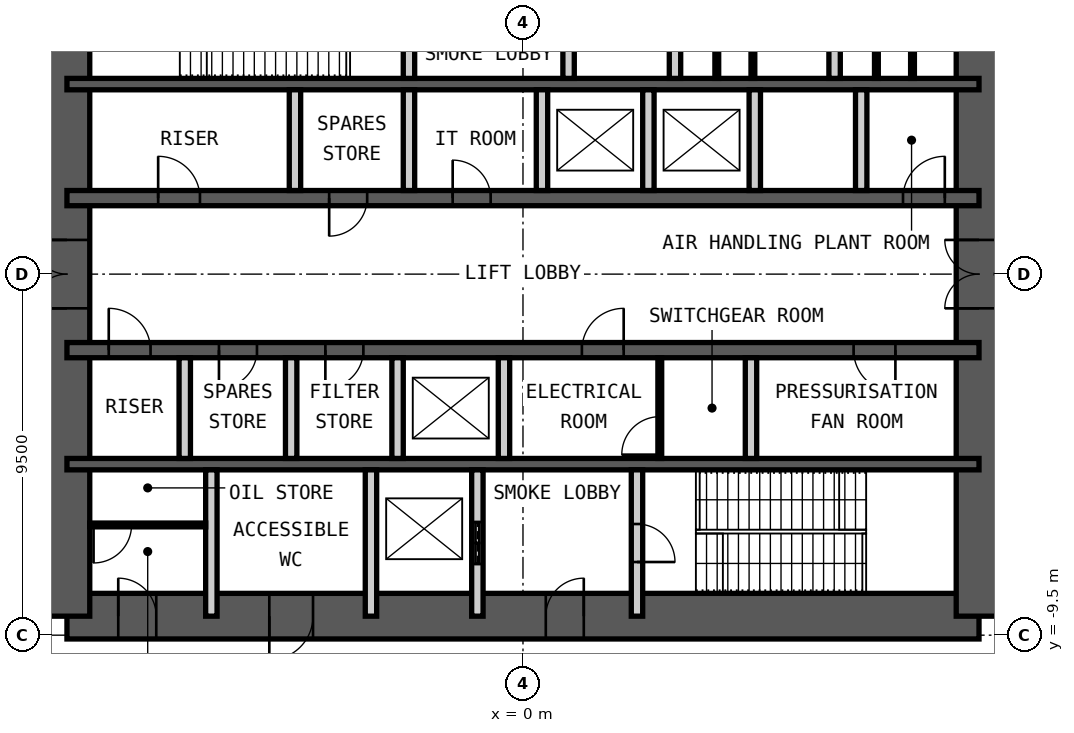
"""IFC4 building model, lengths in metres.
Left out: names, types, materials, properties, quantities, classifications, styles, units other than length and angle.
Written with IfcOpenShell. Run it as: python <this file> out.ifc"""

import sys

from ifc_helpers import new_model, si_unit, direction, frame, frame_2d, origin, place, context, subcontext, project, spatial, rectangle, extrude, element, fill, save


model = new_model("IFC4")
c1 = context("Model", 3, precision=1e-05, world=origin(), true_north=direction((0.0, 1.0)))
c2 = subcontext(c1, "Body", "Model", "MODEL_VIEW")
j1 = project(units=[si_unit("LENGTHUNIT", "METRE"), si_unit("PLANEANGLEUNIT", "RADIAN")], contexts=[c1])
p1 = place(None, origin())
s1 = spatial("IfcSite", under=j1, at=p1, CompositionType="ELEMENT")
p2 = place(p1, origin())
s2 = spatial("IfcBuilding", under=s1, at=p2, CompositionType="ELEMENT")
p3 = place(p2, frame((0.0, 0.0, 256.0)))
s3 = spatial("IfcBuildingStorey", under=s2, at=p3, CompositionType="ELEMENT", Elevation=256.0)
p4 = place(p3, frame((-12.0, -9.0, 0.0), z_axis=(0.0, 0.0, 1.0), x_axis=(1.0, 0.0, 0.0)))
e1 = element("IfcWall", 1, at=p4, inside=s3, PredefinedType="SHEAR", context=c2, shape_type="SweptSolid", body=[
    extrude(rectangle(XDim=24.0, YDim=1.2, at=frame_2d((12.0, 0.0))), origin(), (0.0, 0.0, 1.0), 6.0),
])
p5 = place(p4, frame((1.35, 0.0, 0.0)))
e2 = element("IfcOpeningElement", 2, at=p5, cuts=e1, PredefinedType="OPENING", context=c2, shape_type="SweptSolid", body=[
    extrude(rectangle(XDim=1.0, YDim=2.1, at=frame_2d((0.5, 1.05))), frame((0.0, 0.61, 0.0), z_axis=(0.0, -1.0, 0.0), x_axis=(1.0, 0.0, 0.0)), (0.0, 0.0, 1.0), 1.22),
])
p6 = place(p4, frame((5.325, 0.0, 0.0)))
e3 = element("IfcOpeningElement", 3, at=p6, cuts=e1, PredefinedType="OPENING", context=c2, shape_type="SweptSolid", body=[
    extrude(rectangle(XDim=1.15, YDim=2.1, at=frame_2d((0.575, 1.05))), frame((0.0, 0.61, 0.0), z_axis=(0.0, -1.0, 0.0), x_axis=(1.0, 0.0, 0.0)), (0.0, 0.0, 1.0), 1.22),
])
p7 = place(p4, frame((12.6, 0.0, 0.0)))
e4 = element("IfcOpeningElement", 4, at=p7, cuts=e1, PredefinedType="OPENING", context=c2, shape_type="SweptSolid", body=[
    extrude(rectangle(XDim=1.0, YDim=2.1, at=frame_2d((0.5, 1.05))), frame((0.0, 0.61, 0.0), z_axis=(0.0, -1.0, 0.0), x_axis=(1.0, 0.0, 0.0)), (0.0, 0.0, 1.0), 1.22),
])
p8 = place(p3, frame((12.0, -9.0, 0.0), z_axis=(0.0, 0.0, 1.0), x_axis=(0.0, 1.0, 0.0)))
e5 = element("IfcWall", 5, at=p8, inside=s3, PredefinedType="SHEAR", context=c2, shape_type="SweptSolid", body=[
    extrude(rectangle(XDim=18.0, YDim=1.2, at=frame_2d((9.0, 0.0))), origin(), (0.0, 0.0, 1.0), 6.0),
])
p9 = place(p8, frame((8.1, 0.0, 0.0)))
e6 = element("IfcOpeningElement", 6, at=p9, cuts=e5, PredefinedType="OPENING", context=c2, shape_type="SweptSolid", body=[
    extrude(rectangle(XDim=1.8, YDim=2.1, at=frame_2d((0.9, 1.05))), frame((0.0, 0.61, 0.0), z_axis=(0.0, -1.0, 0.0), x_axis=(1.0, 0.0, 0.0)), (0.0, 0.0, 1.0), 1.22),
])
p10 = place(p3, frame((-12.0, -9.0, 0.0), z_axis=(0.0, 0.0, 1.0), x_axis=(0.0, 1.0, 0.0)))
e7 = element("IfcWall", 7, at=p10, inside=s3, PredefinedType="SHEAR", context=c2, shape_type="SweptSolid", body=[
    extrude(rectangle(XDim=18.0, YDim=1.2, at=frame_2d((9.0, 0.0))), origin(), (0.0, 0.0, 1.0), 6.0),
])
p11 = place(p10, frame((8.1, 0.0, 0.0)))
e8 = element("IfcOpeningElement", 8, at=p11, cuts=e7, PredefinedType="OPENING", context=c2, shape_type="SweptSolid", body=[
    extrude(rectangle(XDim=1.8, YDim=2.1, at=frame_2d((0.9, 1.05))), frame((0.0, 0.61, 0.0), z_axis=(0.0, -1.0, 0.0), x_axis=(1.0, 0.0, 0.0)), (0.0, 0.0, 1.0), 1.22),
])
p12 = place(p3, frame((-12.0, 5.0, 0.0), z_axis=(0.0, 0.0, 1.0), x_axis=(1.0, 0.0, 0.0)))
e9 = element("IfcWall", 9, at=p12, inside=s3, PredefinedType="SHEAR", context=c2, shape_type="SweptSolid", body=[
    extrude(rectangle(XDim=24.0, YDim=0.3, at=frame_2d((12.0, 0.0))), origin(), (0.0, 0.0, 1.0), 6.0),
])
p13 = place(p3, frame((-12.0, 2.0, 0.0), z_axis=(0.0, 0.0, 1.0), x_axis=(1.0, 0.0, 0.0)))
e10 = element("IfcWall", 10, at=p13, inside=s3, PredefinedType="SHEAR", context=c2, shape_type="SweptSolid", body=[
    extrude(rectangle(XDim=24.0, YDim=0.4, at=frame_2d((12.0, 0.0))), origin(), (0.0, 0.0, 1.0), 6.0),
])
p14 = place(p13, frame((2.4, 0.0, 0.0)))
e11 = element("IfcOpeningElement", 11, at=p14, cuts=e10, PredefinedType="OPENING", context=c2, shape_type="SweptSolid", body=[
    extrude(rectangle(XDim=1.1, YDim=2.1, at=frame_2d((0.55, 1.05))), frame((0.0, 0.21, 0.0), z_axis=(0.0, -1.0, 0.0), x_axis=(1.0, 0.0, 0.0)), (0.0, 0.0, 1.0), 0.42),
])
p15 = place(p13, frame((22.0, 0.0, 0.0)))
e12 = element("IfcOpeningElement", 12, at=p15, cuts=e10, PredefinedType="OPENING", context=c2, shape_type="SweptSolid", body=[
    extrude(rectangle(XDim=1.1, YDim=2.1, at=frame_2d((0.55, 1.05))), frame((0.0, 0.21, 0.0), z_axis=(0.0, -1.0, 0.0), x_axis=(1.0, 0.0, 0.0)), (0.0, 0.0, 1.0), 0.42),
])
p16 = place(p13, frame((10.15, 0.0, 0.0)))
e13 = element("IfcOpeningElement", 13, at=p16, cuts=e10, PredefinedType="OPENING", context=c2, shape_type="SweptSolid", body=[
    extrude(rectangle(XDim=1.0, YDim=2.1, at=frame_2d((0.5, 1.05))), frame((0.0, 0.21, 0.0), z_axis=(0.0, -1.0, 0.0), x_axis=(1.0, 0.0, 0.0)), (0.0, 0.0, 1.0), 0.42),
])
p17 = place(p13, frame((6.9, 0.0, 0.0)))
e14 = element("IfcOpeningElement", 14, at=p17, cuts=e10, PredefinedType="OPENING", context=c2, shape_type="SweptSolid", body=[
    extrude(rectangle(XDim=1.0, YDim=2.1, at=frame_2d((0.5, 1.05))), frame((0.0, 0.21, 0.0), z_axis=(0.0, -1.0, 0.0), x_axis=(1.0, 0.0, 0.0)), (0.0, 0.0, 1.0), 0.42),
])
p18 = place(p3, frame((-12.0, -2.0, 0.0), z_axis=(0.0, 0.0, 1.0), x_axis=(1.0, 0.0, 0.0)))
e15 = element("IfcWall", 15, at=p18, inside=s3, PredefinedType="SHEAR", context=c2, shape_type="SweptSolid", body=[
    extrude(rectangle(XDim=24.0, YDim=0.4, at=frame_2d((12.0, 0.0))), origin(), (0.0, 0.0, 1.0), 6.0),
])
p19 = place(p18, frame((1.1, 0.0, 0.0)))
e16 = element("IfcOpeningElement", 16, at=p19, cuts=e15, PredefinedType="OPENING", context=c2, shape_type="SweptSolid", body=[
    extrude(rectangle(XDim=1.1, YDim=2.1, at=frame_2d((0.55, 1.05))), frame((0.0, 0.21, 0.0), z_axis=(0.0, -1.0, 0.0), x_axis=(1.0, 0.0, 0.0)), (0.0, 0.0, 1.0), 0.42),
])
p20 = place(p18, frame((13.55, 0.0, 0.0)))
e17 = element("IfcOpeningElement", 17, at=p20, cuts=e15, PredefinedType="OPENING", context=c2, shape_type="SweptSolid", body=[
    extrude(rectangle(XDim=1.1, YDim=2.1, at=frame_2d((0.55, 1.05))), frame((0.0, 0.21, 0.0), z_axis=(0.0, -1.0, 0.0), x_axis=(1.0, 0.0, 0.0)), (0.0, 0.0, 1.0), 0.42),
])
p21 = place(p18, frame((20.7, 0.0, 0.0)))
e18 = element("IfcOpeningElement", 18, at=p21, cuts=e15, PredefinedType="OPENING", context=c2, shape_type="SweptSolid", body=[
    extrude(rectangle(XDim=1.1, YDim=2.1, at=frame_2d((0.55, 1.05))), frame((0.0, 0.21, 0.0), z_axis=(0.0, -1.0, 0.0), x_axis=(1.0, 0.0, 0.0)), (0.0, 0.0, 1.0), 0.42),
])
p22 = place(p18, frame((4.0, 0.0, 0.0)))
e19 = element("IfcOpeningElement", 19, at=p22, cuts=e15, PredefinedType="OPENING", context=c2, shape_type="SweptSolid", body=[
    extrude(rectangle(XDim=1.0, YDim=2.1, at=frame_2d((0.5, 1.05))), frame((0.0, 0.21, 0.0), z_axis=(0.0, -1.0, 0.0), x_axis=(1.0, 0.0, 0.0)), (0.0, 0.0, 1.0), 0.42),
])
p23 = place(p18, frame((6.8, 0.0, 0.0)))
e20 = element("IfcOpeningElement", 20, at=p23, cuts=e15, PredefinedType="OPENING", context=c2, shape_type="SweptSolid", body=[
    extrude(rectangle(XDim=1.0, YDim=2.1, at=frame_2d((0.5, 1.05))), frame((0.0, 0.21, 0.0), z_axis=(0.0, -1.0, 0.0), x_axis=(1.0, 0.0, 0.0)), (0.0, 0.0, 1.0), 0.42),
])
p24 = place(p3, frame((-12.0, -5.0, 0.0), z_axis=(0.0, 0.0, 1.0), x_axis=(1.0, 0.0, 0.0)))
e21 = element("IfcWall", 21, at=p24, inside=s3, PredefinedType="SHEAR", context=c2, shape_type="SweptSolid", body=[
    extrude(rectangle(XDim=24.0, YDim=0.3, at=frame_2d((12.0, 0.0))), origin(), (0.0, 0.0, 1.0), 6.0),
])
p25 = place(p3, frame((-3.0, 5.15, 0.0), z_axis=(0.0, 0.0, 1.0), x_axis=(0.0, 1.0, 0.0)))
e22 = element("IfcWall", 22, at=p25, inside=s3, PredefinedType="PARTITIONING", context=c2, shape_type="SweptSolid", body=[
    extrude(rectangle(XDim=3.85, YDim=0.3, at=frame_2d((1.925, 0.0))), origin(), (0.0, 0.0, 1.0), 5.78),
])
p26 = place(p25, frame((1.425, 0.0, 0.0)))
e23 = element("IfcOpeningElement", 23, at=p26, cuts=e22, PredefinedType="OPENING", context=c2, shape_type="SweptSolid", body=[
    extrude(rectangle(XDim=1.0, YDim=2.1, at=frame_2d((0.5, 1.05))), frame((0.0, 0.16, 0.0), z_axis=(0.0, -1.0, 0.0), x_axis=(1.0, 0.0, 0.0)), (0.0, 0.0, 1.0), 0.32),
])
p27 = place(p3, frame((1.2, 5.15, 0.0), z_axis=(0.0, 0.0, 1.0), x_axis=(0.0, 1.0, 0.0)))
e24 = element("IfcWall", 24, at=p27, inside=s3, PredefinedType="PARTITIONING", context=c2, shape_type="SweptSolid", body=[
    extrude(rectangle(XDim=3.85, YDim=0.3, at=frame_2d((1.925, 0.0))), origin(), (0.0, 0.0, 1.0), 5.78),
])
p28 = place(p27, frame((1.375, 0.0, 0.0)))
e25 = element("IfcOpeningElement", 25, at=p28, cuts=e24, PredefinedType="OPENING", context=c2, shape_type="SweptSolid", body=[
    extrude(rectangle(XDim=1.1, YDim=2.4, at=frame_2d((0.55, 1.2))), frame((0.0, 0.16, 0.0), z_axis=(0.0, -1.0, 0.0), x_axis=(1.0, 0.0, 0.0)), (0.0, 0.0, 1.0), 0.32),
])
for number, where, z_axis, x_axis in (
    (26, (4.0, 5.15, 0.0), (0.0, 0.0, 1.0), (0.0, 1.0, 0.0)),
    (27, (8.2, 5.15, 0.0), (0.0, 0.0, 1.0), (0.0, 1.0, 0.0)),
):
    element("IfcWall", number, at=place(p3, frame(where, z_axis=z_axis, x_axis=x_axis)), inside=s3, PredefinedType="PARTITIONING", context=c2, shape_type="SweptSolid", body=[
        extrude(rectangle(XDim=3.85, YDim=0.3, at=frame_2d((1.925, 0.0))), origin(), (0.0, 0.0, 1.0), 5.78),
    ])
for number, where, z_axis, x_axis in (
    (28, (-6.0, 2.2, 0.0), (0.0, 0.0, 1.0), (0.0, 1.0, 0.0)),
    (29, (-3.0, 2.2, 0.0), (0.0, 0.0, 1.0), (0.0, 1.0, 0.0)),
    (30, (0.5, 2.2, 0.0), (0.0, 0.0, 1.0), (0.0, 1.0, 0.0)),
    (31, (3.3, 2.2, 0.0), (0.0, 0.0, 1.0), (0.0, 1.0, 0.0)),
    (32, (6.1, 2.2, 0.0), (0.0, 0.0, 1.0), (0.0, 1.0, 0.0)),
    (33, (8.9, 2.2, 0.0), (0.0, 0.0, 1.0), (0.0, 1.0, 0.0)),
    (34, (-8.9, -4.85, 0.0), (0.0, 0.0, 1.0), (0.0, 1.0, 0.0)),
    (35, (-6.1, -4.85, 0.0), (0.0, 0.0, 1.0), (0.0, 1.0, 0.0)),
    (36, (-3.3, -4.85, 0.0), (0.0, 0.0, 1.0), (0.0, 1.0, 0.0)),
    (37, (-0.5, -4.85, 0.0), (0.0, 0.0, 1.0), (0.0, 1.0, 0.0)),
    (38, (6.0, -4.85, 0.0), (0.0, 0.0, 1.0), (0.0, 1.0, 0.0)),
):
    element("IfcWall", number, at=place(p3, frame(where, z_axis=z_axis, x_axis=x_axis)), inside=s3, PredefinedType="PARTITIONING", context=c2, shape_type="SweptSolid", body=[
        extrude(rectangle(XDim=2.65, YDim=0.3, at=frame_2d((1.325, 0.0))), origin(), (0.0, 0.0, 1.0), 5.78),
    ])
for number, where, z_axis, x_axis in (
    (39, (-8.2, -9.0, 0.0), (0.0, 0.0, 1.0), (0.0, 1.0, 0.0)),
    (40, (-4.0, -9.0, 0.0), (0.0, 0.0, 1.0), (0.0, 1.0, 0.0)),
):
    element("IfcWall", number, at=place(p3, frame(where, z_axis=z_axis, x_axis=x_axis)), inside=s3, PredefinedType="PARTITIONING", context=c2, shape_type="SweptSolid", body=[
        extrude(rectangle(XDim=3.85, YDim=0.3, at=frame_2d((1.925, 0.0))), origin(), (0.0, 0.0, 1.0), 5.78),
    ])
p29 = place(p3, frame((-1.2, -9.0, 0.0), z_axis=(0.0, 0.0, 1.0), x_axis=(0.0, 1.0, 0.0)))
e41 = element("IfcWall", 41, at=p29, inside=s3, PredefinedType="PARTITIONING", context=c2, shape_type="SweptSolid", body=[
    extrude(rectangle(XDim=3.85, YDim=0.3, at=frame_2d((1.925, 0.0))), origin(), (0.0, 0.0, 1.0), 5.78),
])
p30 = place(p29, frame((1.375, 0.0, 0.0)))
e42 = element("IfcOpeningElement", 42, at=p30, cuts=e41, PredefinedType="OPENING", context=c2, shape_type="SweptSolid", body=[
    extrude(rectangle(XDim=1.1, YDim=2.4, at=frame_2d((0.55, 1.2))), frame((0.0, 0.16, 0.0), z_axis=(0.0, -1.0, 0.0), x_axis=(1.0, 0.0, 0.0)), (0.0, 0.0, 1.0), 0.32),
])
p31 = place(p3, frame((3.0, -9.0, 0.0), z_axis=(0.0, 0.0, 1.0), x_axis=(0.0, 1.0, 0.0)))
e43 = element("IfcWall", 43, at=p31, inside=s3, PredefinedType="PARTITIONING", context=c2, shape_type="SweptSolid", body=[
    extrude(rectangle(XDim=3.85, YDim=0.3, at=frame_2d((1.925, 0.0))), origin(), (0.0, 0.0, 1.0), 5.78),
])
p32 = place(p31, frame((1.425, 0.0, 0.0)))
e44 = element("IfcOpeningElement", 44, at=p32, cuts=e43, PredefinedType="OPENING", context=c2, shape_type="SweptSolid", body=[
    extrude(rectangle(XDim=1.0, YDim=2.1, at=frame_2d((0.5, 1.05))), frame((0.0, 0.16, 0.0), z_axis=(0.0, -1.0, 0.0), x_axis=(1.0, 0.0, 0.0)), (0.0, 0.0, 1.0), 0.32),
])
p33 = place(p3, frame((3.6, -4.85, 0.0), z_axis=(0.0, 0.0, 1.0), x_axis=(0.0, 1.0, 0.0)))
e45 = element("IfcWall", 45, at=p33, inside=s3, PredefinedType="PARTITIONING", context=c2, shape_type="SweptSolid", body=[
    extrude(rectangle(XDim=2.65, YDim=0.1, at=frame_2d((1.325, 0.0))), origin(), (0.0, 0.0, 1.0), 5.78),
])
p34 = place(p33, frame((0.1, 0.0, 0.0)))
e46 = element("IfcOpeningElement", 46, at=p34, cuts=e45, PredefinedType="OPENING", context=c2, shape_type="SweptSolid", body=[
    extrude(rectangle(XDim=1.0, YDim=2.4, at=frame_2d((0.5, 1.2))), frame((0.0, 0.06, 0.0), z_axis=(0.0, -1.0, 0.0), x_axis=(1.0, 0.0, 0.0)), (0.0, 0.0, 1.0), 0.12),
])
p35 = place(p3, frame((-11.4, -6.6, 0.0), z_axis=(0.0, 0.0, 1.0), x_axis=(1.0, 0.0, 0.0)))
e47 = element("IfcWall", 47, at=p35, inside=s3, PredefinedType="PARTITIONING", context=c2, shape_type="SweptSolid", body=[
    extrude(rectangle(XDim=3.05, YDim=0.1, at=frame_2d((1.525, 0.0))), origin(), (0.0, 0.0, 1.0), 5.78),
])
p36 = place(p35, frame((0.1, 0.0, 0.0)))
e48 = element("IfcOpeningElement", 48, at=p36, cuts=e47, PredefinedType="OPENING", context=c2, shape_type="SweptSolid", body=[
    extrude(rectangle(XDim=1.0, YDim=2.4, at=frame_2d((0.5, 1.2))), frame((0.0, 0.06, 0.0), z_axis=(0.0, -1.0, 0.0), x_axis=(1.0, 0.0, 0.0)), (0.0, 0.0, 1.0), 0.12),
])
for number, where, z_axis, x_axis in (
    (49, (5.1, 5.15, 0.0), (0.0, 0.0, 1.0), (0.0, 1.0, 0.0)),
    (50, (6.05, 5.15, 0.0), (0.0, 0.0, 1.0), (0.0, 1.0, 0.0)),
    (51, (9.3, 5.15, 0.0), (0.0, 0.0, 1.0), (0.0, 1.0, 0.0)),
    (52, (10.25, 5.15, 0.0), (0.0, 0.0, 1.0), (0.0, 1.0, 0.0)),
):
    element("IfcWall", number, at=place(p3, frame(where, z_axis=z_axis, x_axis=x_axis)), inside=s3, PredefinedType="PARTITIONING", context=c2, shape_type="SweptSolid", body=[
        extrude(rectangle(XDim=1.5, YDim=0.1, at=frame_2d((0.75, 0.0))), origin(), (0.0, 0.0, 1.0), 2.1),
    ])
p37 = place(p3, frame((-11.917, -11.76, 0.0), z_axis=(0.0, 0.0, 1.0), x_axis=(-0.500003318956, 0.866023487576, 0.0)))
e53 = element("IfcWall", 53, at=p37, inside=s3, PredefinedType="PARTITIONING", context=c2, shape_type="SweptSolid", body=[
    extrude(rectangle(XDim=6.496, YDim=0.2, at=frame_2d((3.248, 0.0))), origin(), (0.0, 0.0, 1.0), 5.83),
])
p38 = place(p37, frame((4.197, 0.0, 0.0)))
e54 = element("IfcOpeningElement", 54, at=p38, cuts=e53, PredefinedType="OPENING", context=c2, shape_type="SweptSolid", body=[
    extrude(rectangle(XDim=2.0, YDim=2.4, at=frame_2d((1.0, 1.2))), frame((0.0, 0.11, 0.0), z_axis=(0.0, -1.0, 0.0), x_axis=(1.0, 0.0, 0.0)), (0.0, 0.0, 1.0), 0.22),
])
p39 = place(p5, origin())
e55 = element("IfcDoor", 55, at=p39, inside=s3, OperationType="SINGLE_SWING_RIGHT", PredefinedType="DOOR", context=c2, shape_type="SweptSolid", body=[
    extrude(rectangle(XDim=1.0, YDim=2.1, at=frame_2d((0.5, 1.05))), frame((0.0, 0.025, 0.0), z_axis=(0.0, -1.0, 0.0), x_axis=(1.0, 0.0, 0.0)), (0.0, 0.0, 1.0), 0.05),
])
fill(e2, e55)
p40 = place(p6, origin())
e56 = element("IfcDoor", 56, at=p40, inside=s3, OperationType="SINGLE_SWING_LEFT", PredefinedType="DOOR", context=c2, shape_type="SweptSolid", body=[
    extrude(rectangle(XDim=1.15, YDim=2.1, at=frame_2d((0.575, 1.05))), frame((0.0, 0.025, 0.0), z_axis=(0.0, -1.0, 0.0), x_axis=(1.0, 0.0, 0.0)), (0.0, 0.0, 1.0), 0.05),
])
fill(e3, e56)
p41 = place(p7, origin())
e57 = element("IfcDoor", 57, at=p41, inside=s3, OperationType="SINGLE_SWING_LEFT", PredefinedType="DOOR", context=c2, shape_type="SweptSolid", body=[
    extrude(rectangle(XDim=1.0, YDim=2.1, at=frame_2d((0.5, 1.05))), frame((0.0, 0.025, 0.0), z_axis=(0.0, -1.0, 0.0), x_axis=(1.0, 0.0, 0.0)), (0.0, 0.0, 1.0), 0.05),
])
fill(e4, e57)
p42 = place(p32, origin())
e58 = element("IfcDoor", 58, at=p42, inside=s3, OperationType="SINGLE_SWING_LEFT", PredefinedType="DOOR", context=c2, shape_type="SweptSolid", body=[
    extrude(rectangle(XDim=1.0, YDim=2.1, at=frame_2d((0.5, 1.05))), frame((0.0, 0.025, 0.0), z_axis=(0.0, -1.0, 0.0), x_axis=(1.0, 0.0, 0.0)), (0.0, 0.0, 1.0), 0.05),
])
fill(e44, e58)
p43 = place(p14, origin())
e59 = element("IfcDoor", 59, at=p43, inside=s3, OperationType="SINGLE_SWING_RIGHT", PredefinedType="DOOR", context=c2, shape_type="SweptSolid", body=[
    extrude(rectangle(XDim=1.1, YDim=2.1, at=frame_2d((0.55, 1.05))), frame((0.0, 0.025, 0.0), z_axis=(0.0, -1.0, 0.0), x_axis=(1.0, 0.0, 0.0)), (0.0, 0.0, 1.0), 0.05),
])
fill(e11, e59)
p44 = place(p19, origin())
e60 = element("IfcDoor", 60, at=p44, inside=s3, OperationType="SINGLE_SWING_RIGHT", PredefinedType="DOOR", context=c2, shape_type="SweptSolid", body=[
    extrude(rectangle(XDim=1.1, YDim=2.1, at=frame_2d((0.55, 1.05))), frame((0.0, 0.025, 0.0), z_axis=(0.0, -1.0, 0.0), x_axis=(1.0, 0.0, 0.0)), (0.0, 0.0, 1.0), 0.05),
])
fill(e16, e60)
p45 = place(p15, origin())
e61 = element("IfcDoor", 61, at=p45, inside=s3, OperationType="SINGLE_SWING_LEFT", PredefinedType="DOOR", context=c2, shape_type="SweptSolid", body=[
    extrude(rectangle(XDim=1.1, YDim=2.1, at=frame_2d((0.55, 1.05))), frame((0.0, 0.025, 0.0), z_axis=(0.0, -1.0, 0.0), x_axis=(1.0, 0.0, 0.0)), (0.0, 0.0, 1.0), 0.05),
])
fill(e12, e61)
p46 = place(p16, origin())
e62 = element("IfcDoor", 62, at=p46, inside=s3, OperationType="SINGLE_SWING_RIGHT", PredefinedType="DOOR", context=c2, shape_type="SweptSolid", body=[
    extrude(rectangle(XDim=1.0, YDim=2.1, at=frame_2d((0.5, 1.05))), frame((0.0, 0.025, 0.0), z_axis=(0.0, -1.0, 0.0), x_axis=(1.0, 0.0, 0.0)), (0.0, 0.0, 1.0), 0.05),
])
fill(e13, e62)
p47 = place(p20, origin())
e63 = element("IfcDoor", 63, at=p47, inside=s3, OperationType="SINGLE_SWING_LEFT", PredefinedType="DOOR", context=c2, shape_type="SweptSolid", body=[
    extrude(rectangle(XDim=1.1, YDim=2.1, at=frame_2d((0.55, 1.05))), frame((0.0, 0.025, 0.0), z_axis=(0.0, -1.0, 0.0), x_axis=(1.0, 0.0, 0.0)), (0.0, 0.0, 1.0), 0.05),
])
fill(e17, e63)
p48 = place(p21, origin())
e64 = element("IfcDoor", 64, at=p48, inside=s3, OperationType="SINGLE_SWING_RIGHT", PredefinedType="DOOR", context=c2, shape_type="SweptSolid", body=[
    extrude(rectangle(XDim=1.1, YDim=2.1, at=frame_2d((0.55, 1.05))), frame((0.0, 0.025, 0.0), z_axis=(0.0, -1.0, 0.0), x_axis=(1.0, 0.0, 0.0)), (0.0, 0.0, 1.0), 0.05),
])
fill(e18, e64)
p49 = place(p9, origin())
e65 = element("IfcDoor", 65, at=p49, inside=s3, OperationType="DOUBLE_DOOR_DOUBLE_SWING", PredefinedType="DOOR", context=c2, shape_type="SweptSolid", body=[
    extrude(rectangle(XDim=1.8, YDim=2.1, at=frame_2d((0.9, 1.05))), frame((0.0, 0.025, 0.0), z_axis=(0.0, -1.0, 0.0), x_axis=(1.0, 0.0, 0.0)), (0.0, 0.0, 1.0), 0.05),
])
fill(e6, e65)
p50 = place(p11, origin())
e66 = element("IfcDoor", 66, at=p50, inside=s3, OperationType="DOUBLE_DOOR_DOUBLE_SWING", PredefinedType="DOOR", context=c2, shape_type="SweptSolid", body=[
    extrude(rectangle(XDim=1.8, YDim=2.1, at=frame_2d((0.9, 1.05))), frame((0.0, 0.025, 0.0), z_axis=(0.0, -1.0, 0.0), x_axis=(1.0, 0.0, 0.0)), (0.0, 0.0, 1.0), 0.05),
])
fill(e8, e66)
p51 = place(p30, origin())
e67 = element("IfcDoor", 67, at=p51, inside=s3, OperationType="DOUBLE_DOOR_SLIDING", PredefinedType="DOOR", context=c2, shape_type="SweptSolid", body=[
    extrude(rectangle(XDim=1.1, YDim=2.4, at=frame_2d((0.55, 1.2))), frame((0.0, 0.025, 0.0), z_axis=(0.0, -1.0, 0.0), x_axis=(1.0, 0.0, 0.0)), (0.0, 0.0, 1.0), 0.05),
])
fill(e42, e67)
p52 = place(p17, origin())
e68 = element("IfcDoor", 68, at=p52, inside=s3, OperationType="SINGLE_SWING_LEFT", PredefinedType="DOOR", context=c2, shape_type="SweptSolid", body=[
    extrude(rectangle(XDim=1.0, YDim=2.1, at=frame_2d((0.5, 1.05))), frame((0.0, 0.025, 0.0), z_axis=(0.0, -1.0, 0.0), x_axis=(1.0, 0.0, 0.0)), (0.0, 0.0, 1.0), 0.05),
])
fill(e14, e68)
p53 = place(p22, origin())
e69 = element("IfcDoor", 69, at=p53, inside=s3, OperationType="SINGLE_SWING_LEFT", PredefinedType="DOOR", context=c2, shape_type="SweptSolid", body=[
    extrude(rectangle(XDim=1.0, YDim=2.1, at=frame_2d((0.5, 1.05))), frame((0.0, 0.025, 0.0), z_axis=(0.0, -1.0, 0.0), x_axis=(1.0, 0.0, 0.0)), (0.0, 0.0, 1.0), 0.05),
])
fill(e19, e69)
p54 = place(p23, origin())
e70 = element("IfcDoor", 70, at=p54, inside=s3, OperationType="SINGLE_SWING_LEFT", PredefinedType="DOOR", context=c2, shape_type="SweptSolid", body=[
    extrude(rectangle(XDim=1.0, YDim=2.1, at=frame_2d((0.5, 1.05))), frame((0.0, 0.025, 0.0), z_axis=(0.0, -1.0, 0.0), x_axis=(1.0, 0.0, 0.0)), (0.0, 0.0, 1.0), 0.05),
])
fill(e20, e70)
p55 = place(p34, origin())
e71 = element("IfcDoor", 71, at=p55, inside=s3, OperationType="SINGLE_SWING_RIGHT", PredefinedType="DOOR", context=c2, shape_type="SweptSolid", body=[
    extrude(rectangle(XDim=1.0, YDim=2.4, at=frame_2d((0.5, 1.2))), frame((0.0, 0.025, 0.0), z_axis=(0.0, -1.0, 0.0), x_axis=(1.0, 0.0, 0.0)), (0.0, 0.0, 1.0), 0.05),
])
fill(e46, e71)
p56 = place(p36, origin())
e72 = element("IfcDoor", 72, at=p56, inside=s3, OperationType="SINGLE_SWING_LEFT", PredefinedType="DOOR", context=c2, shape_type="SweptSolid", body=[
    extrude(rectangle(XDim=1.0, YDim=2.4, at=frame_2d((0.5, 1.2))), frame((0.0, 0.025, 0.0), z_axis=(0.0, -1.0, 0.0), x_axis=(1.0, 0.0, 0.0)), (0.0, 0.0, 1.0), 0.05),
])
fill(e48, e72)
save(model, sys.argv[1])
